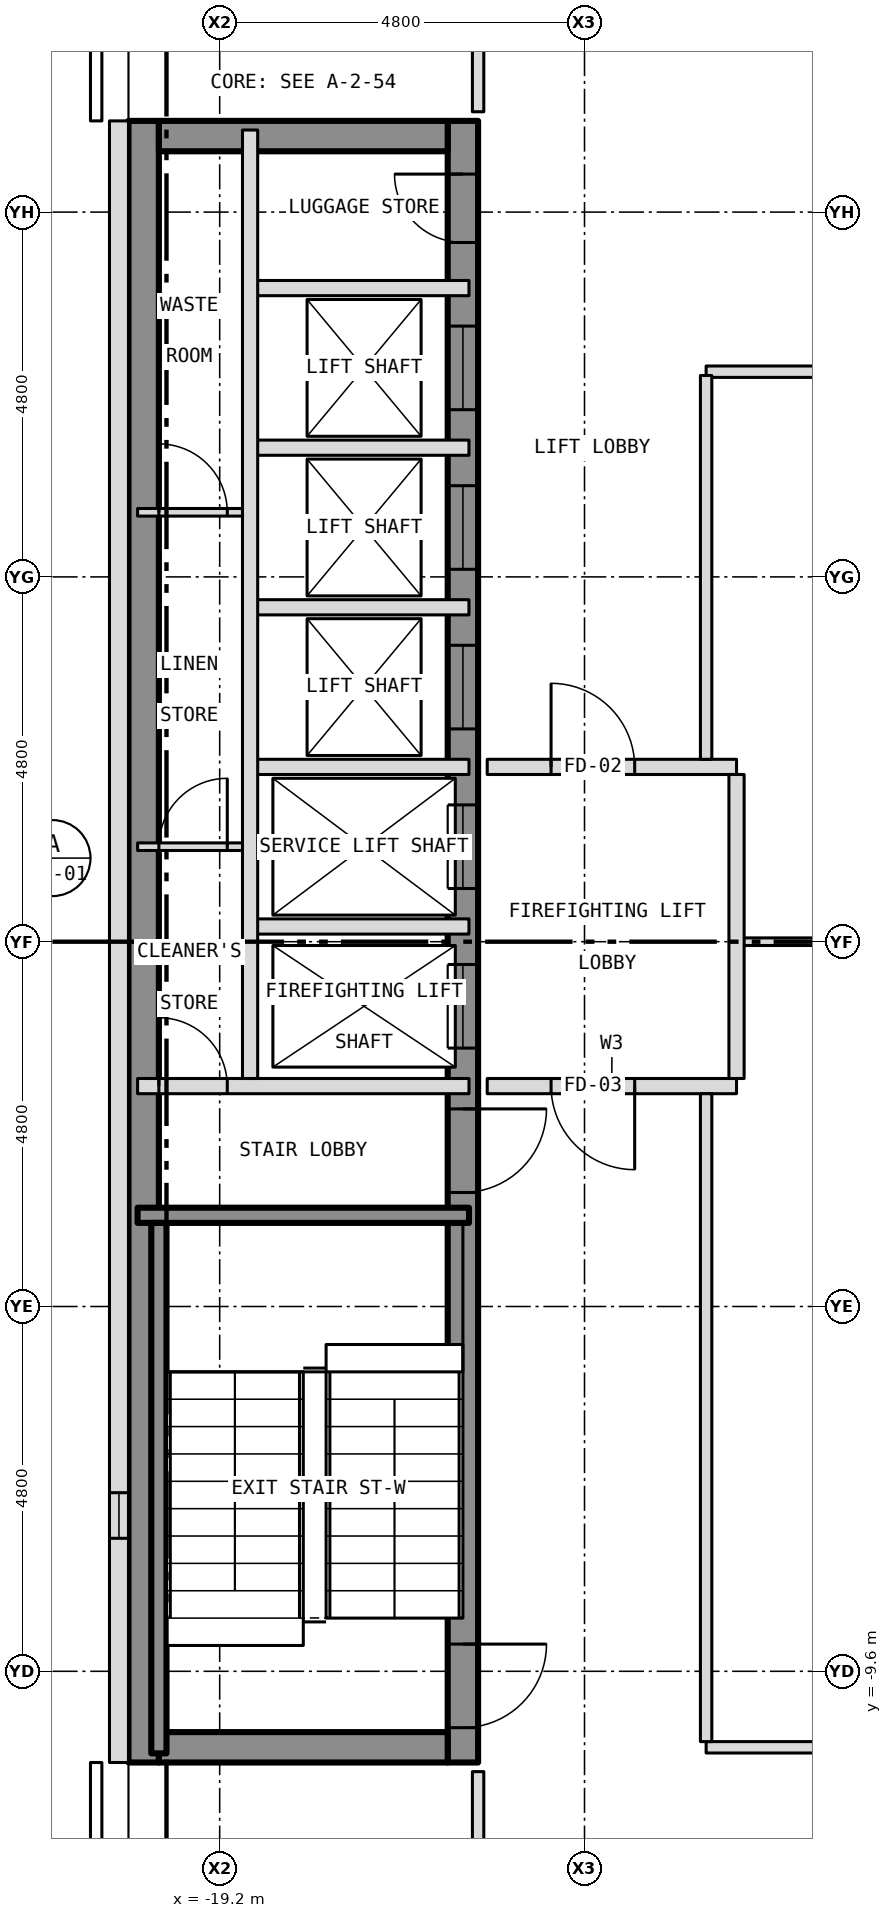
"""IFC4 building model, lengths in metres.
Left out: names, types, materials, properties, quantities, classifications, styles, units other than length and angle.
Written with IfcOpenShell. Run it as: python <this file> out.ifc"""

import sys

from ifc_helpers import new_model, si_unit, direction, frame, frame_2d, origin, place, context, subcontext, project, spatial, rectangle, extrude, element, fill, save


model = new_model("IFC4")
c1 = context("Model", 3, precision=1e-05, world=origin(), true_north=direction((0.0, 1.0)))
c2 = subcontext(c1, "Body", "Model", "MODEL_VIEW")
j1 = project(units=[si_unit("LENGTHUNIT", "METRE"), si_unit("PLANEANGLEUNIT", "RADIAN")], contexts=[c1])
p1 = place(None, origin())
s1 = spatial("IfcSite", under=j1, at=p1, CompositionType="ELEMENT")
p2 = place(p1, origin())
s2 = spatial("IfcBuilding", under=s1, at=p2, CompositionType="ELEMENT")
p3 = place(p2, frame((0.0, 0.0, 198.0)))
s3 = spatial("IfcBuildingStorey", under=s2, at=p3, CompositionType="ELEMENT", Elevation=198.0)
p4 = place(p3, frame((-16.0, -10.8, 0.0), z_axis=(0.0, 0.0, 1.0), x_axis=(0.0, 1.0, 0.0)))
e1 = element("IfcWall", 1, at=p4, inside=s3, PredefinedType="SHEAR", context=c2, shape_type="SweptSolid", body=[
    extrude(rectangle(XDim=21.6, YDim=0.4, at=frame_2d((10.8, 0.0))), origin(), (0.0, 0.0, 1.0), 3.25),
])
p5 = place(p4, frame((9.4, 0.0, 0.0)))
e2 = element("IfcOpeningElement", 2, at=p5, cuts=e1, PredefinedType="OPENING", context=c2, shape_type="SweptSolid", body=[
    extrude(rectangle(XDim=1.1, YDim=2.1, at=frame_2d((0.55, 1.05))), frame((0.0, 0.212, 0.0), z_axis=(0.0, -1.0, 0.0), x_axis=(1.0, 0.0, 0.0)), (0.0, 0.0, 1.0), 0.424),
])
p6 = place(p4, frame((11.5, 0.0, 0.0)))
e3 = element("IfcOpeningElement", 3, at=p6, cuts=e1, PredefinedType="OPENING", context=c2, shape_type="SweptSolid", body=[
    extrude(rectangle(XDim=1.1, YDim=2.1, at=frame_2d((0.55, 1.05))), frame((0.0, 0.212, 0.0), z_axis=(0.0, -1.0, 0.0), x_axis=(1.0, 0.0, 0.0)), (0.0, 0.0, 1.0), 0.424),
])
p7 = place(p4, frame((13.6, 0.0, 0.0)))
e4 = element("IfcOpeningElement", 4, at=p7, cuts=e1, PredefinedType="OPENING", context=c2, shape_type="SweptSolid", body=[
    extrude(rectangle(XDim=1.1, YDim=2.1, at=frame_2d((0.55, 1.05))), frame((0.0, 0.212, 0.0), z_axis=(0.0, -1.0, 0.0), x_axis=(1.0, 0.0, 0.0)), (0.0, 0.0, 1.0), 0.424),
])
p8 = place(p4, frame((15.7, 0.0, 0.0)))
e5 = element("IfcOpeningElement", 5, at=p8, cuts=e1, PredefinedType="OPENING", context=c2, shape_type="SweptSolid", body=[
    extrude(rectangle(XDim=1.1, YDim=2.1, at=frame_2d((0.55, 1.05))), frame((0.0, 0.212, 0.0), z_axis=(0.0, -1.0, 0.0), x_axis=(1.0, 0.0, 0.0)), (0.0, 0.0, 1.0), 0.424),
])
p9 = place(p4, frame((17.8, 0.0, 0.0)))
e6 = element("IfcOpeningElement", 6, at=p9, cuts=e1, PredefinedType="OPENING", context=c2, shape_type="SweptSolid", body=[
    extrude(rectangle(XDim=1.1, YDim=2.1, at=frame_2d((0.55, 1.05))), frame((0.0, 0.212, 0.0), z_axis=(0.0, -1.0, 0.0), x_axis=(1.0, 0.0, 0.0)), (0.0, 0.0, 1.0), 0.424),
])
p10 = place(p4, frame((0.458, 0.0, 0.0)))
e7 = element("IfcOpeningElement", 7, at=p10, cuts=e1, PredefinedType="OPENING", context=c2, shape_type="SweptSolid", body=[
    extrude(rectangle(XDim=1.1, YDim=2.1, at=frame_2d((0.55, 1.05))), frame((0.0, 0.212, 0.0), z_axis=(0.0, -1.0, 0.0), x_axis=(1.0, 0.0, 0.0)), (0.0, 0.0, 1.0), 0.424),
])
p11 = place(p4, frame((7.5, 0.0, 0.0)))
e8 = element("IfcOpeningElement", 8, at=p11, cuts=e1, PredefinedType="OPENING", context=c2, shape_type="SweptSolid", body=[
    extrude(rectangle(XDim=1.1, YDim=2.1, at=frame_2d((0.55, 1.05))), frame((0.0, 0.212, 0.0), z_axis=(0.0, -1.0, 0.0), x_axis=(1.0, 0.0, 0.0)), (0.0, 0.0, 1.0), 0.424),
])
p12 = place(p4, frame((20.0, 0.0, 0.0)))
e9 = element("IfcOpeningElement", 9, at=p12, cuts=e1, PredefinedType="OPENING", context=c2, shape_type="SweptSolid", body=[
    extrude(rectangle(XDim=0.9, YDim=2.1, at=frame_2d((0.45, 1.05))), frame((0.0, 0.212, 0.0), z_axis=(0.0, -1.0, 0.0), x_axis=(1.0, 0.0, 0.0)), (0.0, 0.0, 1.0), 0.424),
])
p13 = place(p3, frame((-20.2, -10.8, 0.0), z_axis=(0.0, 0.0, 1.0), x_axis=(0.0, 1.0, 0.0)))
e10 = element("IfcWall", 10, at=p13, inside=s3, PredefinedType="SHEAR", context=c2, shape_type="SweptSolid", body=[
    extrude(rectangle(XDim=21.6, YDim=0.4, at=frame_2d((10.8, 0.0))), origin(), (0.0, 0.0, 1.0), 3.25),
])
for number, where, z_axis, x_axis in (
    (11, (-20.0, 10.6, 0.0), (0.0, 0.0, 1.0), (1.0, 0.0, 0.0)),
    (12, (-20.0, -10.6, 0.0), (0.0, 0.0, 1.0), (1.0, 0.0, 0.0)),
):
    element("IfcWall", number, at=place(p3, frame(where, z_axis=z_axis, x_axis=x_axis)), inside=s3, PredefinedType="SHEAR", context=c2, shape_type="SweptSolid", body=[
        extrude(rectangle(XDim=3.8, YDim=0.4, at=frame_2d((1.9, 0.0))), origin(), (0.0, 0.0, 1.0), 3.25),
    ])
p14 = place(p3, frame((-20.525, 10.8, 0.0), z_axis=(0.0, 0.0, 1.0), x_axis=(0.0, -1.0, 0.0)))
e13 = element("IfcWall", 13, at=p14, inside=s3, PredefinedType="SOLIDWALL", context=c2, shape_type="SweptSolid", body=[
    extrude(rectangle(XDim=21.6, YDim=0.25, at=frame_2d((10.8, 0.0))), origin(), (0.0, 0.0, 1.0), 3.5),
])
p15 = place(p14, frame((18.05, 0.0, 1.0)))
e14 = element("IfcOpeningElement", 14, at=p15, cuts=e13, PredefinedType="OPENING", context=c2, shape_type="SweptSolid", body=[
    extrude(rectangle(XDim=0.6, YDim=1.5, at=frame_2d((0.3, 0.75))), frame((0.0, 0.137, 0.0), z_axis=(0.0, -1.0, 0.0), x_axis=(1.0, 0.0, 0.0)), (0.0, 0.0, 1.0), 0.274),
])
p16 = place(p3, frame((-12.8, -10.6, 0.0), z_axis=(0.0, 0.0, 1.0), x_axis=(1.0, 0.0, 0.0)))
e15 = element("IfcWall", 15, at=p16, inside=s3, PredefinedType="PARTITIONING", context=c2, shape_type="SweptSolid", body=[
    extrude(rectangle(XDim=16.9, YDim=0.15, at=frame_2d((8.45, 0.0))), origin(), (0.0, 0.0, 1.0), 3.35),
])
p17 = place(p16, frame((5.95, 0.0, 0.0)))
e16 = element("IfcOpeningElement", 16, at=p17, cuts=e15, PredefinedType="OPENING", context=c2, shape_type="SweptSolid", body=[
    extrude(rectangle(XDim=0.9, YDim=2.1, at=frame_2d((0.45, 1.05))), frame((0.0, 0.087, 0.0), z_axis=(0.0, -1.0, 0.0), x_axis=(1.0, 0.0, 0.0)), (0.0, 0.0, 1.0), 0.174),
])
p18 = place(p3, frame((-20.28, -3.6, 0.0), z_axis=(0.0, 0.0, 1.0), x_axis=(1.0, 0.0, 0.0)))
e17 = element("IfcWall", 17, at=p18, inside=s3, PredefinedType="SHEAR", context=c2, shape_type="SweptSolid", body=[
    extrude(rectangle(XDim=4.36, YDim=0.2, at=frame_2d((2.18, 0.0))), origin(), (0.0, 0.0, 1.0), 3.25),
])
p19 = place(p3, frame((-20.28, -1.9, 0.0), z_axis=(0.0, 0.0, 1.0), x_axis=(1.0, 0.0, 0.0)))
e18 = element("IfcWall", 18, at=p19, inside=s3, PredefinedType="PARTITIONING", context=c2, shape_type="SweptSolid", body=[
    extrude(rectangle(XDim=4.36, YDim=0.2, at=frame_2d((2.18, 0.0))), origin(), (0.0, 0.0, 1.0), 3.25),
])
p20 = place(p19, frame((0.28, 0.0, 0.0)))
e19 = element("IfcOpeningElement", 19, at=p20, cuts=e18, PredefinedType="OPENING", context=c2, shape_type="SweptSolid", body=[
    extrude(rectangle(XDim=0.9, YDim=2.1, at=frame_2d((0.45, 1.05))), frame((0.0, 0.112, 0.0), z_axis=(0.0, -1.0, 0.0), x_axis=(1.0, 0.0, 0.0)), (0.0, 0.0, 1.0), 0.224),
])
p21 = place(p3, frame((-15.68, -1.9, 0.0), z_axis=(0.0, 0.0, 1.0), x_axis=(1.0, 0.0, 0.0)))
e20 = element("IfcWall", 20, at=p21, inside=s3, PredefinedType="PARTITIONING", context=c2, shape_type="SweptSolid", body=[
    extrude(rectangle(XDim=3.28, YDim=0.2, at=frame_2d((1.64, 0.0))), origin(), (0.0, 0.0, 1.0), 3.35),
])
p22 = place(p21, frame((0.84, 0.0, 0.0)))
e21 = element("IfcOpeningElement", 21, at=p22, cuts=e20, PredefinedType="OPENING", context=c2, shape_type="SweptSolid", body=[
    extrude(rectangle(XDim=1.1, YDim=2.1, at=frame_2d((0.55, 1.05))), frame((0.0, 0.112, 0.0), z_axis=(0.0, -1.0, 0.0), x_axis=(1.0, 0.0, 0.0)), (0.0, 0.0, 1.0), 0.224),
])
p23 = place(p3, frame((-12.4, 0.0, 0.0), z_axis=(0.0, 0.0, 1.0), x_axis=(1.0, 0.0, 0.0)))
e22 = element("IfcWall", 22, at=p23, inside=s3, PredefinedType="PARTITIONING", context=c2, shape_type="SweptSolid", body=[
    extrude(rectangle(XDim=2.613, YDim=0.1, at=frame_2d((1.306, 0.0))), origin(), (0.0, 0.0, 1.0), 2.728),
])
p24 = place(p3, frame((-18.8, 0.2, 0.0), z_axis=(0.0, 0.0, 1.0), x_axis=(1.0, 0.0, 0.0)))
e23 = element("IfcWall", 23, at=p24, inside=s3, PredefinedType="PARTITIONING", context=c2, shape_type="SweptSolid", body=[
    extrude(rectangle(XDim=2.88, YDim=0.2, at=frame_2d((1.44, 0.0))), origin(), (0.0, 0.0, 1.0), 3.25),
])
p25 = place(p3, frame((-20.28, 1.25, 0.0), z_axis=(0.0, 0.0, 1.0), x_axis=(1.0, 0.0, 0.0)))
e24 = element("IfcWall", 24, at=p25, inside=s3, PredefinedType="PARTITIONING", context=c2, shape_type="SweptSolid", body=[
    extrude(rectangle(XDim=1.48, YDim=0.1, at=frame_2d((0.74, 0.0))), origin(), (0.0, 0.0, 1.0), 3.25),
])
p26 = place(p25, frame((0.28, 0.0, 0.0)))
e25 = element("IfcOpeningElement", 25, at=p26, cuts=e24, PredefinedType="OPENING", context=c2, shape_type="SweptSolid", body=[
    extrude(rectangle(XDim=0.9, YDim=2.1, at=frame_2d((0.45, 1.05))), frame((0.0, 0.062, 0.0), z_axis=(0.0, -1.0, 0.0), x_axis=(1.0, 0.0, 0.0)), (0.0, 0.0, 1.0), 0.124),
])
p27 = place(p3, frame((-18.8, 2.3, 0.0), z_axis=(0.0, 0.0, 1.0), x_axis=(1.0, 0.0, 0.0)))
e26 = element("IfcWall", 26, at=p27, inside=s3, PredefinedType="PARTITIONING", context=c2, shape_type="SweptSolid", body=[
    extrude(rectangle(XDim=2.88, YDim=0.2, at=frame_2d((1.44, 0.0))), origin(), (0.0, 0.0, 1.0), 3.25),
])
p28 = place(p3, frame((-15.68, 2.3, 0.0), z_axis=(0.0, 0.0, 1.0), x_axis=(1.0, 0.0, 0.0)))
e27 = element("IfcWall", 27, at=p28, inside=s3, PredefinedType="PARTITIONING", context=c2, shape_type="SweptSolid", body=[
    extrude(rectangle(XDim=3.28, YDim=0.2, at=frame_2d((1.64, 0.0))), origin(), (0.0, 0.0, 1.0), 3.35),
])
p29 = place(p28, frame((0.84, 0.0, 0.0)))
e28 = element("IfcOpeningElement", 28, at=p29, cuts=e27, PredefinedType="OPENING", context=c2, shape_type="SweptSolid", body=[
    extrude(rectangle(XDim=1.1, YDim=2.1, at=frame_2d((0.55, 1.05))), frame((0.0, 0.112, 0.0), z_axis=(0.0, -1.0, 0.0), x_axis=(1.0, 0.0, 0.0)), (0.0, 0.0, 1.0), 0.224),
])
p30 = place(p3, frame((-18.8, 4.4, 0.0), z_axis=(0.0, 0.0, 1.0), x_axis=(1.0, 0.0, 0.0)))
e29 = element("IfcWall", 29, at=p30, inside=s3, PredefinedType="PARTITIONING", context=c2, shape_type="SweptSolid", body=[
    extrude(rectangle(XDim=2.88, YDim=0.2, at=frame_2d((1.44, 0.0))), origin(), (0.0, 0.0, 1.0), 3.25),
])
p31 = place(p3, frame((-20.28, 5.65, 0.0), z_axis=(0.0, 0.0, 1.0), x_axis=(1.0, 0.0, 0.0)))
e30 = element("IfcWall", 30, at=p31, inside=s3, PredefinedType="PARTITIONING", context=c2, shape_type="SweptSolid", body=[
    extrude(rectangle(XDim=1.48, YDim=0.1, at=frame_2d((0.74, 0.0))), origin(), (0.0, 0.0, 1.0), 3.25),
])
p32 = place(p31, frame((0.28, 0.0, 0.0)))
e31 = element("IfcOpeningElement", 31, at=p32, cuts=e30, PredefinedType="OPENING", context=c2, shape_type="SweptSolid", body=[
    extrude(rectangle(XDim=0.9, YDim=2.1, at=frame_2d((0.45, 1.05))), frame((0.0, 0.062, 0.0), z_axis=(0.0, -1.0, 0.0), x_axis=(1.0, 0.0, 0.0)), (0.0, 0.0, 1.0), 0.124),
])
p33 = place(p3, frame((-18.8, 6.5, 0.0), z_axis=(0.0, 0.0, 1.0), x_axis=(1.0, 0.0, 0.0)))
e32 = element("IfcWall", 32, at=p33, inside=s3, PredefinedType="PARTITIONING", context=c2, shape_type="SweptSolid", body=[
    extrude(rectangle(XDim=2.88, YDim=0.2, at=frame_2d((1.44, 0.0))), origin(), (0.0, 0.0, 1.0), 3.25),
])
p34 = place(p3, frame((-12.8, 7.5, 0.0), z_axis=(0.0, 0.0, 1.0), x_axis=(1.0, 0.0, 0.0)))
e33 = element("IfcWall", 33, at=p34, inside=s3, PredefinedType="PARTITIONING", context=c2, shape_type="SweptSolid", body=[
    extrude(rectangle(XDim=16.9, YDim=0.15, at=frame_2d((8.45, 0.0))), origin(), (0.0, 0.0, 1.0), 3.35),
])
p35 = place(p34, frame((14.4, 0.0, 0.0)))
e34 = element("IfcOpeningElement", 34, at=p35, cuts=e33, PredefinedType="OPENING", context=c2, shape_type="SweptSolid", body=[
    extrude(rectangle(XDim=0.9, YDim=2.1, at=frame_2d((0.45, 1.05))), frame((0.0, 0.087, 0.0), z_axis=(0.0, -1.0, 0.0), x_axis=(1.0, 0.0, 0.0)), (0.0, 0.0, 1.0), 0.174),
])
p36 = place(p34, frame((5.95, 0.0, 0.0)))
e35 = element("IfcOpeningElement", 35, at=p36, cuts=e33, PredefinedType="OPENING", context=c2, shape_type="SweptSolid", body=[
    extrude(rectangle(XDim=0.9, YDim=2.1, at=frame_2d((0.45, 1.05))), frame((0.0, 0.087, 0.0), z_axis=(0.0, -1.0, 0.0), x_axis=(1.0, 0.0, 0.0)), (0.0, 0.0, 1.0), 0.174),
])
p37 = place(p3, frame((-18.8, 8.6, 0.0), z_axis=(0.0, 0.0, 1.0), x_axis=(1.0, 0.0, 0.0)))
e36 = element("IfcWall", 36, at=p37, inside=s3, PredefinedType="PARTITIONING", context=c2, shape_type="SweptSolid", body=[
    extrude(rectangle(XDim=2.88, YDim=0.2, at=frame_2d((1.44, 0.0))), origin(), (0.0, 0.0, 1.0), 3.25),
])
p38 = place(p3, frame((-20.0, -10.68, 0.0), z_axis=(0.0, 0.0, 1.0), x_axis=(0.0, 1.0, 0.0)))
e37 = element("IfcWall", 37, at=p38, inside=s3, PredefinedType="SHEAR", context=c2, shape_type="SweptSolid", body=[
    extrude(rectangle(XDim=6.98, YDim=0.2, at=frame_2d((3.49, 0.0))), origin(), (0.0, 0.0, 1.0), 3.25),
])
p39 = place(p3, frame((-18.8, -1.8, 0.0), z_axis=(0.0, 0.0, 1.0), x_axis=(0.0, 1.0, 0.0)))
e38 = element("IfcWall", 38, at=p39, inside=s3, PredefinedType="PARTITIONING", context=c2, shape_type="SweptSolid", body=[
    extrude(rectangle(XDim=12.48, YDim=0.2, at=frame_2d((6.24, 0.0))), origin(), (0.0, 0.0, 1.0), 3.25),
])
for number, where, z_axis, x_axis in (
    (39, (-15.8, -12.725, 0.0), (0.0, 0.0, 1.0), (0.0, 1.0, 0.0)),
    (40, (-15.8, 10.92, 0.0), (0.0, 0.0, 1.0), (0.0, 1.0, 0.0)),
):
    element("IfcWall", number, at=place(p3, frame(where, z_axis=z_axis, x_axis=x_axis)), inside=s3, PredefinedType="PARTITIONING", context=c2, shape_type="SweptSolid", body=[
        extrude(rectangle(XDim=1.805, YDim=0.15, at=frame_2d((0.903, 0.0))), origin(), (0.0, 0.0, 1.0), 3.35),
    ])
p40 = place(p3, frame((-12.8, -10.525, 0.0), z_axis=(0.0, 0.0, 1.0), x_axis=(0.0, 1.0, 0.0)))
e41 = element("IfcWall", 41, at=p40, inside=s3, PredefinedType="PARTITIONING", context=c2, shape_type="SweptSolid", body=[
    extrude(rectangle(XDim=8.525, YDim=0.15, at=frame_2d((4.262, 0.0))), origin(), (0.0, 0.0, 1.0), 3.35),
])
p41 = place(p3, frame((-12.8, 2.4, 0.0), z_axis=(0.0, 0.0, 1.0), x_axis=(0.0, 1.0, 0.0)))
e42 = element("IfcWall", 42, at=p41, inside=s3, PredefinedType="PARTITIONING", context=c2, shape_type="SweptSolid", body=[
    extrude(rectangle(XDim=5.05, YDim=0.15, at=frame_2d((2.525, 0.0))), origin(), (0.0, 0.0, 1.0), 3.35),
])
p42 = place(p3, frame((-12.4, -1.8, 0.0), z_axis=(0.0, 0.0, 1.0), x_axis=(0.0, 1.0, 0.0)))
e43 = element("IfcWall", 43, at=p42, inside=s3, PredefinedType="PARTITIONING", context=c2, shape_type="SweptSolid", body=[
    extrude(rectangle(XDim=4.0, YDim=0.2, at=frame_2d((2.0, 0.0))), origin(), (0.0, 0.0, 1.0), 3.35),
])
p43 = place(p15, origin())
e44 = element("IfcWindow", 44, at=p43, inside=s3, PartitioningType="SINGLE_PANEL", PredefinedType="WINDOW", context=c2, shape_type="SweptSolid", body=[
    extrude(rectangle(XDim=0.6, YDim=1.5, at=frame_2d((0.3, 0.75))), frame((0.0, -0.035, 0.0), z_axis=(0.0, -1.0, 0.0), x_axis=(1.0, 0.0, 0.0)), (0.0, 0.0, 1.0), 0.06),
])
fill(e14, e44)
p44 = place(p5, origin())
e45 = element("IfcDoor", 45, at=p44, inside=s3, OperationType="SLIDING_TO_LEFT", PredefinedType="DOOR", context=c2, shape_type="SweptSolid", body=[
    extrude(rectangle(XDim=1.1, YDim=2.1, at=frame_2d((0.55, 1.05))), frame((0.0, 0.025, 0.0), z_axis=(0.0, -1.0, 0.0), x_axis=(1.0, 0.0, 0.0)), (0.0, 0.0, 1.0), 0.05),
])
fill(e2, e45)
p45 = place(p6, origin())
e46 = element("IfcDoor", 46, at=p45, inside=s3, OperationType="SLIDING_TO_LEFT", PredefinedType="DOOR", context=c2, shape_type="SweptSolid", body=[
    extrude(rectangle(XDim=1.1, YDim=2.1, at=frame_2d((0.55, 1.05))), frame((0.0, 0.025, 0.0), z_axis=(0.0, -1.0, 0.0), x_axis=(1.0, 0.0, 0.0)), (0.0, 0.0, 1.0), 0.05),
])
fill(e3, e46)
p46 = place(p7, origin())
e47 = element("IfcDoor", 47, at=p46, inside=s3, OperationType="SLIDING_TO_LEFT", PredefinedType="DOOR", context=c2, shape_type="SweptSolid", body=[
    extrude(rectangle(XDim=1.1, YDim=2.1, at=frame_2d((0.55, 1.05))), frame((0.0, 0.025, 0.0), z_axis=(0.0, -1.0, 0.0), x_axis=(1.0, 0.0, 0.0)), (0.0, 0.0, 1.0), 0.05),
])
fill(e4, e47)
p47 = place(p8, origin())
e48 = element("IfcDoor", 48, at=p47, inside=s3, OperationType="SLIDING_TO_LEFT", PredefinedType="DOOR", context=c2, shape_type="SweptSolid", body=[
    extrude(rectangle(XDim=1.1, YDim=2.1, at=frame_2d((0.55, 1.05))), frame((0.0, 0.025, 0.0), z_axis=(0.0, -1.0, 0.0), x_axis=(1.0, 0.0, 0.0)), (0.0, 0.0, 1.0), 0.05),
])
fill(e5, e48)
p48 = place(p9, origin())
e49 = element("IfcDoor", 49, at=p48, inside=s3, OperationType="SLIDING_TO_LEFT", PredefinedType="DOOR", context=c2, shape_type="SweptSolid", body=[
    extrude(rectangle(XDim=1.1, YDim=2.1, at=frame_2d((0.55, 1.05))), frame((0.0, 0.025, 0.0), z_axis=(0.0, -1.0, 0.0), x_axis=(1.0, 0.0, 0.0)), (0.0, 0.0, 1.0), 0.05),
])
fill(e6, e49)
p49 = place(p10, origin())
e50 = element("IfcDoor", 50, at=p49, inside=s3, OperationType="SINGLE_SWING_RIGHT", PredefinedType="DOOR", context=c2, shape_type="SweptSolid", body=[
    extrude(rectangle(XDim=1.1, YDim=2.1, at=frame_2d((0.55, 1.05))), frame((0.0, 0.025, 0.0), z_axis=(0.0, -1.0, 0.0), x_axis=(1.0, 0.0, 0.0)), (0.0, 0.0, 1.0), 0.05),
])
fill(e7, e50)
p50 = place(p11, origin())
e51 = element("IfcDoor", 51, at=p50, inside=s3, OperationType="SINGLE_SWING_RIGHT", PredefinedType="DOOR", context=c2, shape_type="SweptSolid", body=[
    extrude(rectangle(XDim=1.1, YDim=2.1, at=frame_2d((0.55, 1.05))), frame((0.0, 0.025, 0.0), z_axis=(0.0, -1.0, 0.0), x_axis=(1.0, 0.0, 0.0)), (0.0, 0.0, 1.0), 0.05),
])
fill(e8, e51)
p51 = place(p12, origin())
e52 = element("IfcDoor", 52, at=p51, inside=s3, OperationType="SINGLE_SWING_RIGHT", PredefinedType="DOOR", context=c2, shape_type="SweptSolid", body=[
    extrude(rectangle(XDim=0.9, YDim=2.1, at=frame_2d((0.45, 1.05))), frame((0.0, 0.025, 0.0), z_axis=(0.0, -1.0, 0.0), x_axis=(1.0, 0.0, 0.0)), (0.0, 0.0, 1.0), 0.05),
])
fill(e9, e52)
p52 = place(p20, origin())
e53 = element("IfcDoor", 53, at=p52, inside=s3, OperationType="SINGLE_SWING_LEFT", PredefinedType="DOOR", context=c2, shape_type="SweptSolid", body=[
    extrude(rectangle(XDim=0.9, YDim=2.1, at=frame_2d((0.45, 1.05))), frame((0.0, 0.025, 0.0), z_axis=(0.0, -1.0, 0.0), x_axis=(1.0, 0.0, 0.0)), (0.0, 0.0, 1.0), 0.05),
])
fill(e19, e53)
p53 = place(p26, origin())
e54 = element("IfcDoor", 54, at=p53, inside=s3, OperationType="SINGLE_SWING_RIGHT", PredefinedType="DOOR", context=c2, shape_type="SweptSolid", body=[
    extrude(rectangle(XDim=0.9, YDim=2.1, at=frame_2d((0.45, 1.05))), frame((0.0, 0.025, 0.0), z_axis=(0.0, -1.0, 0.0), x_axis=(1.0, 0.0, 0.0)), (0.0, 0.0, 1.0), 0.05),
])
fill(e25, e54)
p54 = place(p32, origin())
e55 = element("IfcDoor", 55, at=p54, inside=s3, OperationType="SINGLE_SWING_LEFT", PredefinedType="DOOR", context=c2, shape_type="SweptSolid", body=[
    extrude(rectangle(XDim=0.9, YDim=2.1, at=frame_2d((0.45, 1.05))), frame((0.0, 0.025, 0.0), z_axis=(0.0, -1.0, 0.0), x_axis=(1.0, 0.0, 0.0)), (0.0, 0.0, 1.0), 0.05),
])
fill(e31, e55)
p55 = place(p29, origin())
e56 = element("IfcDoor", 56, at=p55, inside=s3, OperationType="SINGLE_SWING_LEFT", PredefinedType="DOOR", context=c2, shape_type="SweptSolid", body=[
    extrude(rectangle(XDim=1.1, YDim=2.1, at=frame_2d((0.55, 1.05))), frame((0.0, 0.025, 0.0), z_axis=(0.0, -1.0, 0.0), x_axis=(1.0, 0.0, 0.0)), (0.0, 0.0, 1.0), 0.05),
])
fill(e28, e56)
p56 = place(p22, origin())
e57 = element("IfcDoor", 57, at=p56, inside=s3, OperationType="SINGLE_SWING_RIGHT", PredefinedType="DOOR", context=c2, shape_type="SweptSolid", body=[
    extrude(rectangle(XDim=1.1, YDim=2.1, at=frame_2d((0.55, 1.05))), frame((0.0, 0.025, 0.0), z_axis=(0.0, -1.0, 0.0), x_axis=(1.0, 0.0, 0.0)), (0.0, 0.0, 1.0), 0.05),
])
fill(e21, e57)
save(model, sys.argv[1])
